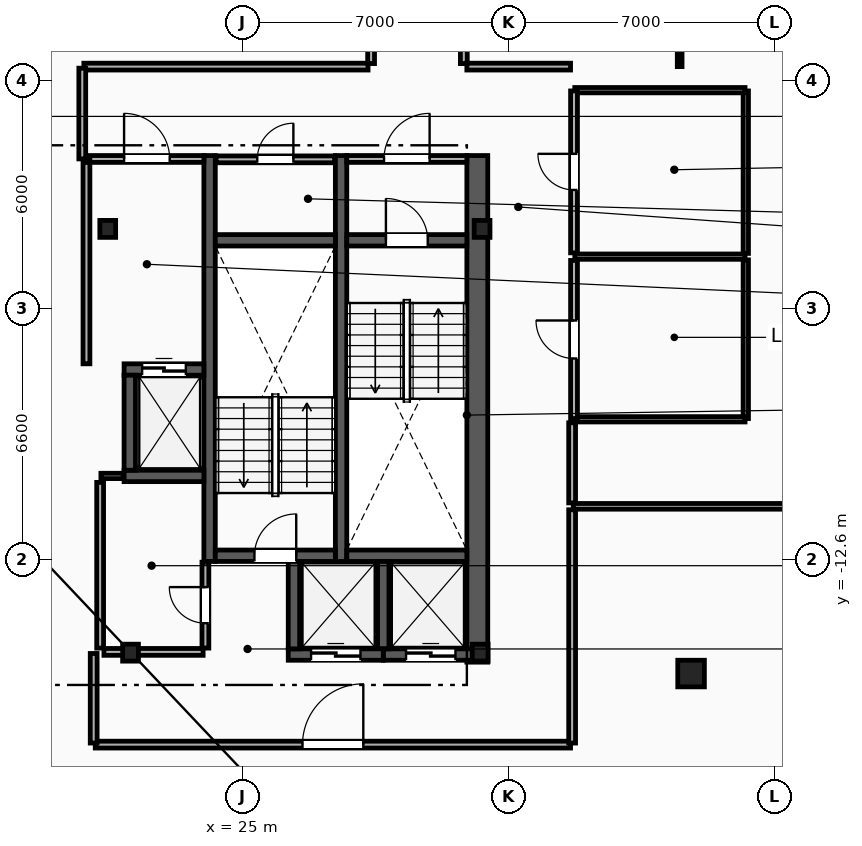
"""IFC4 building model, lengths in metres.
Left out: names, types, materials, properties, quantities, classifications, styles, units other than length and angle.
Written with IfcOpenShell. Run it as: python <this file> out.ifc"""

import sys

from ifc_helpers import new_model, si_unit, direction, frame, frame_2d, origin, origin_2d, place, context, subcontext, project, spatial, rectangle, i_section, extrude, element, fill, save


model = new_model("IFC4")
c1 = context("Model", 3, precision=1e-05, world=origin(), true_north=direction((0.0, 1.0)))
c2 = subcontext(c1, "Body", "Model", "MODEL_VIEW")
j1 = project(units=[si_unit("LENGTHUNIT", "METRE"), si_unit("PLANEANGLEUNIT", "RADIAN")], contexts=[c1])
p1 = place(None, origin())
s1 = spatial("IfcSite", under=j1, at=p1, CompositionType="ELEMENT")
p2 = place(p1, origin())
s2 = spatial("IfcBuilding", under=s1, at=p2, CompositionType="ELEMENT")
p3 = place(p2, frame((0.0, 0.0, 275.6)))
s3 = spatial("IfcBuildingStorey", under=s2, at=p3, CompositionType="ELEMENT", Elevation=275.6)
for number, where, z_axis, x_axis in (
    (1, (31.3, -3.9, 0.0), (0.0, 0.0, 1.0), (1.0, 0.0, 0.0)),
    (2, (21.45, -3.9, 0.0), (0.0, 0.0, 1.0), (1.0, 0.0, 0.0)),
    (3, (22.05, -15.05, 0.0), (0.0, 0.0, 1.0), (1.0, 0.0, 0.0)),
    (4, (31.25, -15.05, 0.0), (0.0, 0.0, 1.0), (1.0, 0.0, 0.0)),
):
    element("IfcColumn", number, at=place(p3, frame(where, z_axis=z_axis, x_axis=x_axis)), inside=s3, PredefinedType="COLUMN", context=c2, shape_type="SweptSolid", body=[
        extrude(i_section(OverallWidth=0.416, OverallDepth=0.446, WebThickness=0.039, FlangeThickness=0.063, FilletRadius=0.018, at=origin_2d()), origin(), (0.0, 0.0, 1.0), 3.6),
    ])
p4 = place(p3, frame((36.8, -15.6, 0.0), z_axis=(0.0, 0.0, 1.0), x_axis=(1.0, 0.0, 0.0)))
e5 = element("IfcColumn", 5, at=p4, inside=s3, PredefinedType="COLUMN", context=c2, shape_type="SweptSolid", body=[
    extrude(rectangle(XDim=0.7, YDim=0.7, at=origin_2d()), origin(), (0.0, 0.0, 1.0), 3.6),
])
p5 = place(p3, frame((31.175, -15.3, 0.0), z_axis=(0.0, 0.0, 1.0), x_axis=(0.0, 1.0, 0.0)))
e6 = element("IfcWall", 6, at=p5, inside=s3, PredefinedType="SHEAR", context=c2, shape_type="SweptSolid", body=[
    extrude(rectangle(XDim=13.33, YDim=0.55, at=frame_2d((6.665, 0.0))), origin(), (0.0, 0.0, 1.0), 3.34),
])
for number, where, z_axis, x_axis in (
    (7, (27.59, -12.65, 0.0), (0.0, 0.0, 1.0), (0.0, 1.0, 0.0)),
    (8, (24.13, -12.65, 0.0), (0.0, 0.0, 1.0), (0.0, 1.0, 0.0)),
):
    element("IfcWall", number, at=place(p3, frame(where, z_axis=z_axis, x_axis=x_axis)), inside=s3, PredefinedType="SHEAR", context=c2, shape_type="SweptSolid", body=[
        extrude(rectangle(XDim=10.68, YDim=0.3, at=frame_2d((5.34, 0.0))), origin(), (0.0, 0.0, 1.0), 3.34),
    ])
p6 = place(p3, frame((27.74, -4.2, 0.0), z_axis=(0.0, 0.0, 1.0), x_axis=(1.0, 0.0, 0.0)))
e9 = element("IfcWall", 9, at=p6, inside=s3, PredefinedType="SHEAR", context=c2, shape_type="SweptSolid", body=[
    extrude(rectangle(XDim=3.16, YDim=0.3, at=frame_2d((1.58, 0.0))), origin(), (0.0, 0.0, 1.0), 3.34),
])
p7 = place(p6, frame((1.03, 0.0, 0.0)))
e10 = element("IfcOpeningElement", 10, at=p7, cuts=e9, PredefinedType="OPENING", context=c2, shape_type="SweptSolid", body=[
    extrude(rectangle(XDim=1.1, YDim=2.15, at=frame_2d((0.55, 1.075))), frame((0.0, 0.16, 0.0), z_axis=(0.0, -1.0, 0.0), x_axis=(1.0, 0.0, 0.0)), (0.0, 0.0, 1.0), 0.32),
])
p8 = place(p3, frame((27.74, -12.5, 0.0), z_axis=(0.0, 0.0, 1.0), x_axis=(1.0, 0.0, 0.0)))
e11 = element("IfcWall", 11, at=p8, inside=s3, PredefinedType="SHEAR", context=c2, shape_type="SweptSolid", body=[
    extrude(rectangle(XDim=3.16, YDim=0.3, at=frame_2d((1.58, 0.0))), origin(), (0.0, 0.0, 1.0), 3.34),
])
p9 = place(p3, frame((24.28, -12.5, 0.0), z_axis=(0.0, 0.0, 1.0), x_axis=(1.0, 0.0, 0.0)))
e12 = element("IfcWall", 12, at=p9, inside=s3, PredefinedType="SHEAR", context=c2, shape_type="SweptSolid", body=[
    extrude(rectangle(XDim=3.16, YDim=0.3, at=frame_2d((1.58, 0.0))), origin(), (0.0, 0.0, 1.0), 3.34),
])
p10 = place(p9, frame((1.03, 0.0, 0.0)))
e13 = element("IfcOpeningElement", 13, at=p10, cuts=e12, PredefinedType="OPENING", context=c2, shape_type="SweptSolid", body=[
    extrude(rectangle(XDim=1.1, YDim=2.15, at=frame_2d((0.55, 1.075))), frame((0.0, 0.16, 0.0), z_axis=(0.0, -1.0, 0.0), x_axis=(1.0, 0.0, 0.0)), (0.0, 0.0, 1.0), 0.32),
])
p11 = place(p3, frame((24.28, -4.2, 0.0), z_axis=(0.0, 0.0, 1.0), x_axis=(1.0, 0.0, 0.0)))
e14 = element("IfcWall", 14, at=p11, inside=s3, PredefinedType="SHEAR", context=c2, shape_type="SweptSolid", body=[
    extrude(rectangle(XDim=3.16, YDim=0.3, at=frame_2d((1.58, 0.0))), origin(), (0.0, 0.0, 1.0), 3.34),
])
p12 = place(p3, frame((20.89, -7.45, 0.0), z_axis=(0.0, 0.0, 1.0), x_axis=(0.0, 1.0, 0.0)))
e15 = element("IfcWall", 15, at=p12, inside=s3, PredefinedType="PARTITIONING", context=c2, shape_type="SweptSolid", body=[
    extrude(rectangle(XDim=5.3, YDim=0.18, at=frame_2d((2.65, 0.0))), origin(), (0.0, 0.0, 1.0), 3.34),
])
p13 = place(p3, frame((20.98, -2.06, 0.0), z_axis=(0.0, 0.0, 1.0), x_axis=(1.0, 0.0, 0.0)))
e16 = element("IfcWall", 16, at=p13, inside=s3, PredefinedType="PARTITIONING", context=c2, shape_type="SweptSolid", body=[
    extrude(rectangle(XDim=3.0, YDim=0.18, at=frame_2d((1.5, 0.0))), origin(), (0.0, 0.0, 1.0), 3.34),
])
p14 = place(p13, frame((0.9, 0.0, 0.0)))
e17 = element("IfcOpeningElement", 17, at=p14, cuts=e16, PredefinedType="OPENING", context=c2, shape_type="SweptSolid", body=[
    extrude(rectangle(XDim=1.2, YDim=2.15, at=frame_2d((0.6, 1.075))), frame((0.0, 0.1, 0.0), z_axis=(0.0, -1.0, 0.0), x_axis=(1.0, 0.0, 0.0)), (0.0, 0.0, 1.0), 0.2),
])
p15 = place(p3, frame((27.74, -2.06, 0.0), z_axis=(0.0, 0.0, 1.0), x_axis=(1.0, 0.0, 0.0)))
e18 = element("IfcWall", 18, at=p15, inside=s3, PredefinedType="PARTITIONING", context=c2, shape_type="SweptSolid", body=[
    extrude(rectangle(XDim=3.16, YDim=0.18, at=frame_2d((1.58, 0.0))), origin(), (0.0, 0.0, 1.0), 3.34),
])
p16 = place(p15, frame((0.98, 0.0, 0.0)))
e19 = element("IfcOpeningElement", 19, at=p16, cuts=e18, PredefinedType="OPENING", context=c2, shape_type="SweptSolid", body=[
    extrude(rectangle(XDim=1.2, YDim=2.15, at=frame_2d((0.6, 1.075))), frame((0.0, 0.1, 0.0), z_axis=(0.0, -1.0, 0.0), x_axis=(1.0, 0.0, 0.0)), (0.0, 0.0, 1.0), 0.2),
])
p17 = place(p3, frame((21.88, -7.6, 0.0), z_axis=(0.0, 0.0, 1.0), x_axis=(1.0, 0.0, 0.0)))
e20 = element("IfcWall", 20, at=p17, inside=s3, PredefinedType="SHEAR", context=c2, shape_type="SweptSolid", body=[
    extrude(rectangle(XDim=2.1, YDim=0.3, at=frame_2d((1.05, 0.0))), origin(), (0.0, 0.0, 1.0), 3.34),
])
p18 = place(p17, frame((0.475, 0.0, 0.0)))
e21 = element("IfcOpeningElement", 21, at=p18, cuts=e20, PredefinedType="OPENING", context=c2, shape_type="SweptSolid", body=[
    extrude(rectangle(XDim=1.15, YDim=2.2, at=frame_2d((0.575, 1.1))), frame((0.0, 0.16, 0.0), z_axis=(0.0, -1.0, 0.0), x_axis=(1.0, 0.0, 0.0)), (0.0, 0.0, 1.0), 0.32),
])
p19 = place(p3, frame((21.88, -10.4, 0.0), z_axis=(0.0, 0.0, 1.0), x_axis=(1.0, 0.0, 0.0)))
e22 = element("IfcWall", 22, at=p19, inside=s3, PredefinedType="SHEAR", context=c2, shape_type="SweptSolid", body=[
    extrude(rectangle(XDim=2.1, YDim=0.3, at=frame_2d((1.05, 0.0))), origin(), (0.0, 0.0, 1.0), 3.34),
])
p20 = place(p3, frame((22.03, -10.25, 0.0), z_axis=(0.0, 0.0, 1.0), x_axis=(0.0, 1.0, 0.0)))
e23 = element("IfcWall", 23, at=p20, inside=s3, PredefinedType="SHEAR", context=c2, shape_type="SweptSolid", body=[
    extrude(rectangle(XDim=2.5, YDim=0.3, at=frame_2d((1.25, 0.0))), origin(), (0.0, 0.0, 1.0), 3.34),
])
p21 = place(p3, frame((28.7, -15.1, 0.0), z_axis=(0.0, 0.0, 1.0), x_axis=(1.0, 0.0, 0.0)))
e24 = element("IfcWall", 24, at=p21, inside=s3, PredefinedType="SHEAR", context=c2, shape_type="SweptSolid", body=[
    extrude(rectangle(XDim=2.5, YDim=0.3, at=frame_2d((1.25, 0.0))), origin(), (0.0, 0.0, 1.0), 3.34),
])
p22 = place(p21, frame((0.6, 0.0, 0.0)))
e25 = element("IfcOpeningElement", 25, at=p22, cuts=e24, PredefinedType="OPENING", context=c2, shape_type="SweptSolid", body=[
    extrude(rectangle(XDim=1.3, YDim=2.2, at=frame_2d((0.65, 1.1))), frame((0.0, 0.16, 0.0), z_axis=(0.0, -1.0, 0.0), x_axis=(1.0, 0.0, 0.0)), (0.0, 0.0, 1.0), 0.32),
])
p23 = place(p3, frame((28.7, -14.95, 0.0), z_axis=(0.0, 0.0, 1.0), x_axis=(0.0, 1.0, 0.0)))
e26 = element("IfcWall", 26, at=p23, inside=s3, PredefinedType="SHEAR", context=c2, shape_type="SweptSolid", body=[
    extrude(rectangle(XDim=2.3, YDim=0.3, at=frame_2d((1.15, 0.0))), origin(), (0.0, 0.0, 1.0), 3.34),
])
p24 = place(p3, frame((26.2, -15.1, 0.0), z_axis=(0.0, 0.0, 1.0), x_axis=(1.0, 0.0, 0.0)))
e27 = element("IfcWall", 27, at=p24, inside=s3, PredefinedType="SHEAR", context=c2, shape_type="SweptSolid", body=[
    extrude(rectangle(XDim=2.5, YDim=0.3, at=frame_2d((1.25, 0.0))), origin(), (0.0, 0.0, 1.0), 3.34),
])
p25 = place(p24, frame((0.6, 0.0, 0.0)))
e28 = element("IfcOpeningElement", 28, at=p25, cuts=e27, PredefinedType="OPENING", context=c2, shape_type="SweptSolid", body=[
    extrude(rectangle(XDim=1.3, YDim=2.2, at=frame_2d((0.65, 1.1))), frame((0.0, 0.16, 0.0), z_axis=(0.0, -1.0, 0.0), x_axis=(1.0, 0.0, 0.0)), (0.0, 0.0, 1.0), 0.32),
])
p26 = place(p3, frame((26.35, -14.95, 0.0), z_axis=(0.0, 0.0, 1.0), x_axis=(0.0, 1.0, 0.0)))
e29 = element("IfcWall", 29, at=p26, inside=s3, PredefinedType="SHEAR", context=c2, shape_type="SweptSolid", body=[
    extrude(rectangle(XDim=2.3, YDim=0.3, at=frame_2d((1.15, 0.0))), origin(), (0.0, 0.0, 1.0), 3.34),
])
p27 = place(p3, frame((21.27, -10.4, 0.0), z_axis=(0.0, 0.0, 1.0), x_axis=(1.0, 0.0, 0.0)))
e30 = element("IfcWall", 30, at=p27, inside=s3, PredefinedType="PARTITIONING", context=c2, shape_type="SweptSolid", body=[
    extrude(rectangle(XDim=0.59, YDim=0.14, at=frame_2d((0.295, 0.0))), origin(), (0.0, 0.0, 1.0), 3.34),
])
p28 = place(p3, frame((21.25, -14.93, 0.0), z_axis=(0.0, 0.0, 1.0), x_axis=(0.0, 1.0, 0.0)))
e31 = element("IfcWall", 31, at=p28, inside=s3, PredefinedType="PARTITIONING", context=c2, shape_type="SweptSolid", body=[
    extrude(rectangle(XDim=4.36, YDim=0.18, at=frame_2d((2.18, 0.0))), origin(), (0.0, 0.0, 1.0), 3.34),
])
p29 = place(p3, frame((21.35, -15.03, 0.0), z_axis=(0.0, 0.0, 1.0), x_axis=(1.0, 0.0, 0.0)))
e32 = element("IfcWall", 32, at=p29, inside=s3, PredefinedType="PARTITIONING", context=c2, shape_type="SweptSolid", body=[
    extrude(rectangle(XDim=2.61, YDim=0.18, at=frame_2d((1.305, 0.0))), origin(), (0.0, 0.0, 1.0), 2.413),
])
p30 = place(p3, frame((24.3, -2.07, 0.0), z_axis=(0.0, 0.0, 1.0), x_axis=(1.0, 0.0, 0.0)))
e33 = element("IfcWall", 33, at=p30, inside=s3, PredefinedType="PARTITIONING", context=c2, shape_type="SweptSolid", body=[
    extrude(rectangle(XDim=3.12, YDim=0.18, at=frame_2d((1.56, 0.0))), origin(), (0.0, 0.0, 1.0), 3.34),
])
p31 = place(p30, frame((1.085, 0.0, 0.0)))
e34 = element("IfcOpeningElement", 34, at=p31, cuts=e33, PredefinedType="OPENING", context=c2, shape_type="SweptSolid", body=[
    extrude(rectangle(XDim=0.95, YDim=2.1, at=frame_2d((0.475, 1.05))), frame((0.0, 0.1, 0.0), z_axis=(0.0, -1.0, 0.0), x_axis=(1.0, 0.0, 0.0)), (0.0, 0.0, 1.0), 0.2),
])
p32 = place(p3, frame((24.02, -14.93, 0.0), z_axis=(0.0, 0.0, 1.0), x_axis=(0.0, 1.0, 0.0)))
e35 = element("IfcWall", 35, at=p32, inside=s3, PredefinedType="PARTITIONING", context=c2, shape_type="SweptSolid", body=[
    extrude(rectangle(XDim=2.26, YDim=0.18, at=frame_2d((1.13, 0.0))), origin(), (0.0, 0.0, 1.0), 3.34),
])
p33 = place(p32, frame((0.655, 0.0, 0.0)))
e36 = element("IfcOpeningElement", 36, at=p33, cuts=e35, PredefinedType="OPENING", context=c2, shape_type="SweptSolid", body=[
    extrude(rectangle(XDim=0.95, YDim=2.1, at=frame_2d((0.475, 1.05))), frame((0.0, 0.1, 0.0), z_axis=(0.0, -1.0, 0.0), x_axis=(1.0, 0.0, 0.0)), (0.0, 0.0, 1.0), 0.2),
])
p34 = place(p3, frame((38.24, -8.89, 0.0), z_axis=(0.0, 0.0, 1.0), x_axis=(0.0, 1.0, 0.0)))
e37 = element("IfcWall", 37, at=p34, inside=s3, PredefinedType="PARTITIONING", context=c2, shape_type="SweptSolid", body=[
    extrude(rectangle(XDim=4.175, YDim=0.14, at=frame_2d((2.087, 0.0))), origin(), (0.0, 0.0, 1.0), 3.34),
])
p35 = place(p3, frame((38.24, -4.545, 0.0), z_axis=(0.0, 0.0, 1.0), x_axis=(0.0, 1.0, 0.0)))
e38 = element("IfcWall", 38, at=p35, inside=s3, PredefinedType="PARTITIONING", context=c2, shape_type="SweptSolid", body=[
    extrude(rectangle(XDim=4.275, YDim=0.14, at=frame_2d((2.137, 0.0))), origin(), (0.0, 0.0, 1.0), 3.34),
])
for number, where, z_axis, x_axis in (
    (39, (33.74, -0.25, 0.0), (0.0, 0.0, 1.0), (1.0, 0.0, 0.0)),
    (40, (33.74, -4.63, 0.0), (0.0, 0.0, 1.0), (1.0, 0.0, 0.0)),
    (41, (33.74, -8.91, 0.0), (0.0, 0.0, 1.0), (1.0, 0.0, 0.0)),
):
    element("IfcWall", number, at=place(p3, frame(where, z_axis=z_axis, x_axis=x_axis)), inside=s3, PredefinedType="PARTITIONING", context=c2, shape_type="SweptSolid", body=[
        extrude(rectangle(XDim=4.48, YDim=0.14, at=frame_2d((2.24, 0.0))), origin(), (0.0, 0.0, 1.0), 3.34),
    ])
p36 = place(p3, frame((33.72, -4.53, 0.0), z_axis=(0.0, 0.0, 1.0), x_axis=(0.0, 1.0, 0.0)))
e42 = element("IfcWall", 42, at=p36, inside=s3, PredefinedType="PARTITIONING", context=c2, shape_type="SweptSolid", body=[
    extrude(rectangle(XDim=4.26, YDim=0.18, at=frame_2d((2.13, 0.0))), origin(), (0.0, 0.0, 1.0), 3.34),
])
p37 = place(p36, frame((1.655, 0.0, 0.0)))
e43 = element("IfcOpeningElement", 43, at=p37, cuts=e42, PredefinedType="OPENING", context=c2, shape_type="SweptSolid", body=[
    extrude(rectangle(XDim=0.95, YDim=2.1, at=frame_2d((0.475, 1.05))), frame((0.0, 0.1, 0.0), z_axis=(0.0, -1.0, 0.0), x_axis=(1.0, 0.0, 0.0)), (0.0, 0.0, 1.0), 0.2),
])
p38 = place(p3, frame((33.72, -8.89, 0.0), z_axis=(0.0, 0.0, 1.0), x_axis=(0.0, 1.0, 0.0)))
e44 = element("IfcWall", 44, at=p38, inside=s3, PredefinedType="PARTITIONING", context=c2, shape_type="SweptSolid", body=[
    extrude(rectangle(XDim=4.16, YDim=0.18, at=frame_2d((2.08, 0.0))), origin(), (0.0, 0.0, 1.0), 3.34),
])
p39 = place(p38, frame((1.58, 0.0, 0.0)))
e45 = element("IfcOpeningElement", 45, at=p39, cuts=e44, PredefinedType="OPENING", context=c2, shape_type="SweptSolid", body=[
    extrude(rectangle(XDim=1.0, YDim=2.15, at=frame_2d((0.5, 1.075))), frame((0.0, 0.1, 0.0), z_axis=(0.0, -1.0, 0.0), x_axis=(1.0, 0.0, 0.0)), (0.0, 0.0, 1.0), 0.2),
])
p40 = place(p3, frame((36.5, 0.37, 0.0), z_axis=(0.0, 0.0, 1.0), x_axis=(0.0, 1.0, 0.0)))
e46 = element("IfcWall", 46, at=p40, inside=s3, PredefinedType="PARTITIONING", context=c2, shape_type="SweptSolid", body=[
    extrude(rectangle(XDim=22.092, YDim=0.125, at=frame_2d((11.046, 0.0))), origin(), (0.0, 0.0, 1.0), 3.34),
])
p41 = place(p3, frame((33.7, -11.2, 0.0), z_axis=(0.0, 0.0, 1.0), x_axis=(1.0, 0.0, 0.0)))
e47 = element("IfcWall", 47, at=p41, inside=s3, PredefinedType="PARTITIONING", context=c2, shape_type="SweptSolid", body=[
    extrude(rectangle(XDim=14.358, YDim=0.15, at=frame_2d((7.179, 0.0))), origin(), (0.0, 0.0, 1.0), 3.34),
])
p42 = place(p3, frame((21.122, -17.47, 0.0), z_axis=(0.0, 0.0, 1.0), x_axis=(1.0, 0.0, 0.0)))
e48 = element("IfcWall", 48, at=p42, inside=s3, PredefinedType="PARTITIONING", context=c2, shape_type="SweptSolid", body=[
    extrude(rectangle(XDim=12.507, YDim=0.18, at=frame_2d((6.253, 0.0))), origin(), (0.0, 0.0, 1.0), 3.34),
])
p43 = place(p42, frame((5.454, 0.0, 0.0)))
e49 = element("IfcOpeningElement", 49, at=p43, cuts=e48, PredefinedType="OPENING", context=c2, shape_type="SweptSolid", body=[
    extrude(rectangle(XDim=1.6, YDim=2.2, at=frame_2d((0.8, 1.1))), frame((0.0, 0.1, 0.0), z_axis=(0.0, -1.0, 0.0), x_axis=(1.0, 0.0, 0.0)), (0.0, 0.0, 1.0), 0.2),
])
for number, where, z_axis, x_axis in (
    (50, (30.82, 0.45, 0.0), (0.0, 0.0, 1.0), (0.0, 1.0, 0.0)),
    (51, (28.38, 10.779, 0.0), (0.0, 0.0, 1.0), (0.0, -1.0, 0.0)),
):
    element("IfcWall", number, at=place(p3, frame(where, z_axis=z_axis, x_axis=x_axis)), inside=s3, PredefinedType="PARTITIONING", context=c2, shape_type="SweptSolid", body=[
        extrude(rectangle(XDim=10.329, YDim=0.18, at=frame_2d((5.164, 0.0))), origin(), (0.0, 0.0, 1.0), 3.34),
    ])
p44 = place(p3, frame((28.3, 0.37, 0.0), z_axis=(0.0, 0.0, 1.0), x_axis=(-1.0, 0.0, 0.0)))
e52 = element("IfcWall", 52, at=p44, inside=s3, PredefinedType="PARTITIONING", context=c2, shape_type="SweptSolid", body=[
    extrude(rectangle(XDim=7.479, YDim=0.18, at=frame_2d((3.739, 0.0))), origin(), (0.0, 0.0, 1.0), 3.34),
])
p45 = place(p3, frame((33.67, -17.428, 0.0), z_axis=(0.0, 0.0, 1.0), x_axis=(0.0, 1.0, 0.0)))
e53 = element("IfcWall", 53, at=p45, inside=s3, PredefinedType="PARTITIONING", context=c2, shape_type="SweptSolid", body=[
    extrude(rectangle(XDim=6.138, YDim=0.18, at=frame_2d((3.069, 0.0))), origin(), (0.0, 0.0, 1.0), 3.34),
])
p46 = place(p3, frame((33.628, 0.37, 0.0), z_axis=(0.0, 0.0, 1.0), x_axis=(-1.0, 0.0, 0.0)))
e54 = element("IfcWall", 54, at=p46, inside=s3, PredefinedType="PARTITIONING", context=c2, shape_type="SweptSolid", body=[
    extrude(rectangle(XDim=2.729, YDim=0.18, at=frame_2d((1.364, 0.0))), origin(), (0.0, 0.0, 1.0), 3.34),
])
p47 = place(p3, frame((20.78, 0.329, 0.0), z_axis=(0.0, 0.0, 1.0), x_axis=(0.0, -1.0, 0.0)))
e55 = element("IfcWall", 55, at=p47, inside=s3, PredefinedType="PARTITIONING", context=c2, shape_type="SweptSolid", body=[
    extrude(rectangle(XDim=2.387, YDim=0.18, at=frame_2d((1.194, 0.0))), origin(), (0.0, 0.0, 1.0), 3.34),
])
p48 = place(p3, frame((21.08, -15.072, 0.0), z_axis=(0.0, 0.0, 1.0), x_axis=(0.0, -1.0, 0.0)))
e56 = element("IfcWall", 56, at=p48, inside=s3, PredefinedType="PARTITIONING", context=c2, shape_type="SweptSolid", body=[
    extrude(rectangle(XDim=2.357, YDim=0.18, at=frame_2d((1.178, 0.0))), origin(), (0.0, 0.0, 1.0), 3.34),
])
p49 = place(p3, frame((33.67, -11.11, 0.0), z_axis=(0.0, 0.0, 1.0), x_axis=(0.0, 1.0, 0.0)))
e57 = element("IfcWall", 57, at=p49, inside=s3, PredefinedType="PARTITIONING", context=c2, shape_type="SweptSolid", body=[
    extrude(rectangle(XDim=2.109, YDim=0.18, at=frame_2d((1.054, 0.0))), origin(), (0.0, 0.0, 1.0), 3.34),
])
p50 = place(p7, origin())
e58 = element("IfcDoor", 58, at=p50, inside=s3, OperationType="SINGLE_SWING_LEFT", PredefinedType="DOOR", context=c2, shape_type="SweptSolid", body=[
    extrude(rectangle(XDim=1.1, YDim=2.15, at=frame_2d((0.55, 1.075))), frame((0.0, 0.025, 0.0), z_axis=(0.0, -1.0, 0.0), x_axis=(1.0, 0.0, 0.0)), (0.0, 0.0, 1.0), 0.05),
])
fill(e10, e58)
p51 = place(p10, origin())
e59 = element("IfcDoor", 59, at=p51, inside=s3, OperationType="SINGLE_SWING_RIGHT", PredefinedType="DOOR", context=c2, shape_type="SweptSolid", body=[
    extrude(rectangle(XDim=1.1, YDim=2.15, at=frame_2d((0.55, 1.075))), frame((0.0, 0.025, 0.0), z_axis=(0.0, -1.0, 0.0), x_axis=(1.0, 0.0, 0.0)), (0.0, 0.0, 1.0), 0.05),
])
fill(e13, e59)
p52 = place(p14, origin())
e60 = element("IfcDoor", 60, at=p52, inside=s3, OperationType="SINGLE_SWING_LEFT", PredefinedType="DOOR", context=c2, shape_type="SweptSolid", body=[
    extrude(rectangle(XDim=1.2, YDim=2.15, at=frame_2d((0.6, 1.075))), frame((0.0, 0.025, 0.0), z_axis=(0.0, -1.0, 0.0), x_axis=(1.0, 0.0, 0.0)), (0.0, 0.0, 1.0), 0.05),
])
fill(e17, e60)
p53 = place(p16, origin())
e61 = element("IfcDoor", 61, at=p53, inside=s3, OperationType="SINGLE_SWING_RIGHT", PredefinedType="DOOR", context=c2, shape_type="SweptSolid", body=[
    extrude(rectangle(XDim=1.2, YDim=2.15, at=frame_2d((0.6, 1.075))), frame((0.0, 0.025, 0.0), z_axis=(0.0, -1.0, 0.0), x_axis=(1.0, 0.0, 0.0)), (0.0, 0.0, 1.0), 0.05),
])
fill(e19, e61)
p54 = place(p18, origin())
e62 = element("IfcDoor", 62, at=p54, inside=s3, OperationType="SLIDING_TO_LEFT", PredefinedType="TRAPDOOR", context=c2, shape_type="SweptSolid", body=[
    extrude(rectangle(XDim=1.15, YDim=2.2, at=frame_2d((0.575, 1.1))), frame((0.0, 0.025, 0.0), z_axis=(0.0, -1.0, 0.0), x_axis=(1.0, 0.0, 0.0)), (0.0, 0.0, 1.0), 0.05),
])
fill(e21, e62)
p55 = place(p22, origin())
e63 = element("IfcDoor", 63, at=p55, inside=s3, OperationType="SLIDING_TO_LEFT", PredefinedType="TRAPDOOR", context=c2, shape_type="SweptSolid", body=[
    extrude(rectangle(XDim=1.3, YDim=2.2, at=frame_2d((0.65, 1.1))), frame((0.0, 0.025, 0.0), z_axis=(0.0, -1.0, 0.0), x_axis=(1.0, 0.0, 0.0)), (0.0, 0.0, 1.0), 0.05),
])
fill(e25, e63)
p56 = place(p25, origin())
e64 = element("IfcDoor", 64, at=p56, inside=s3, OperationType="SLIDING_TO_LEFT", PredefinedType="TRAPDOOR", context=c2, shape_type="SweptSolid", body=[
    extrude(rectangle(XDim=1.3, YDim=2.2, at=frame_2d((0.65, 1.1))), frame((0.0, 0.025, 0.0), z_axis=(0.0, -1.0, 0.0), x_axis=(1.0, 0.0, 0.0)), (0.0, 0.0, 1.0), 0.05),
])
fill(e28, e64)
p57 = place(p43, origin())
e65 = element("IfcDoor", 65, at=p57, inside=s3, OperationType="SINGLE_SWING_RIGHT", PredefinedType="DOOR", context=c2, shape_type="SweptSolid", body=[
    extrude(rectangle(XDim=1.6, YDim=2.2, at=frame_2d((0.8, 1.1))), frame((0.0, 0.025, 0.0), z_axis=(0.0, -1.0, 0.0), x_axis=(1.0, 0.0, 0.0)), (0.0, 0.0, 1.0), 0.05),
])
fill(e49, e65)
p58 = place(p37, origin())
e66 = element("IfcDoor", 66, at=p58, inside=s3, OperationType="SINGLE_SWING_RIGHT", PredefinedType="DOOR", context=c2, shape_type="SweptSolid", body=[
    extrude(rectangle(XDim=0.95, YDim=2.1, at=frame_2d((0.475, 1.05))), frame((0.0, 0.025, 0.0), z_axis=(0.0, -1.0, 0.0), x_axis=(1.0, 0.0, 0.0)), (0.0, 0.0, 1.0), 0.05),
])
fill(e43, e66)
p59 = place(p39, origin())
e67 = element("IfcDoor", 67, at=p59, inside=s3, OperationType="SINGLE_SWING_RIGHT", PredefinedType="DOOR", context=c2, shape_type="SweptSolid", body=[
    extrude(rectangle(XDim=1.0, YDim=2.15, at=frame_2d((0.5, 1.075))), frame((0.0, 0.025, 0.0), z_axis=(0.0, -1.0, 0.0), x_axis=(1.0, 0.0, 0.0)), (0.0, 0.0, 1.0), 0.05),
])
fill(e45, e67)
p60 = place(p31, origin())
e68 = element("IfcDoor", 68, at=p60, inside=s3, OperationType="SINGLE_SWING_RIGHT", PredefinedType="DOOR", context=c2, shape_type="SweptSolid", body=[
    extrude(rectangle(XDim=0.95, YDim=2.1, at=frame_2d((0.475, 1.05))), frame((0.0, 0.025, 0.0), z_axis=(0.0, -1.0, 0.0), x_axis=(1.0, 0.0, 0.0)), (0.0, 0.0, 1.0), 0.05),
])
fill(e34, e68)
p61 = place(p33, origin())
e69 = element("IfcDoor", 69, at=p61, inside=s3, OperationType="SINGLE_SWING_RIGHT", PredefinedType="DOOR", context=c2, shape_type="SweptSolid", body=[
    extrude(rectangle(XDim=0.95, YDim=2.1, at=frame_2d((0.475, 1.05))), frame((0.0, 0.025, 0.0), z_axis=(0.0, -1.0, 0.0), x_axis=(1.0, 0.0, 0.0)), (0.0, 0.0, 1.0), 0.05),
])
fill(e36, e69)
save(model, sys.argv[1])
